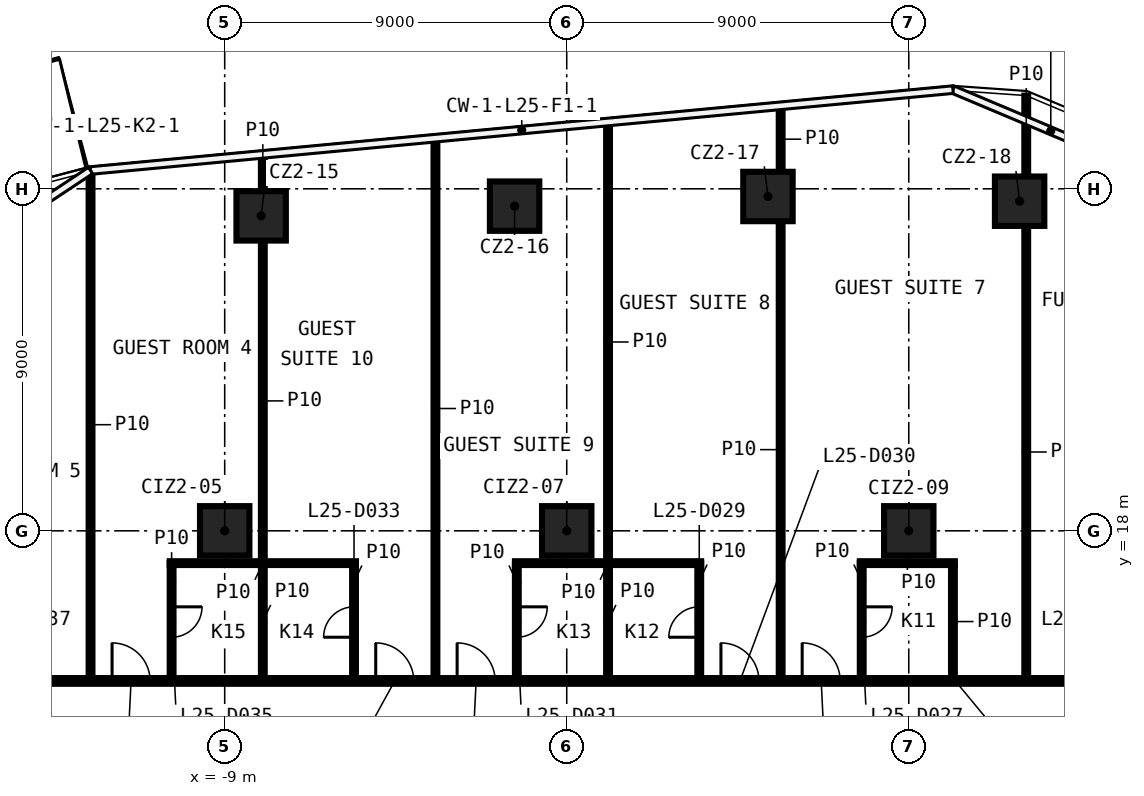
"""IFC4 building model, lengths in metres.
Left out: names, types, materials, properties, quantities, classifications, styles, units other than length and angle.
Written with IfcOpenShell. Run it as: python <this file> out.ifc"""

import sys

from ifc_helpers import new_model, si_unit, direction, frame, frame_2d, origin, origin_2d, place, context, subcontext, project, spatial, rectangle, extrude, element, fill, save


model = new_model("IFC4")
c1 = context("Model", 3, precision=1e-05, world=origin(), true_north=direction((0.0, 1.0)))
c2 = subcontext(c1, "Body", "Model", "MODEL_VIEW")
j1 = project(units=[si_unit("LENGTHUNIT", "METRE"), si_unit("PLANEANGLEUNIT", "RADIAN")], contexts=[c1])
p1 = place(None, origin())
s1 = spatial("IfcSite", under=j1, at=p1, CompositionType="ELEMENT")
p2 = place(p1, origin())
s2 = spatial("IfcBuilding", under=s1, at=p2, CompositionType="ELEMENT")
p3 = place(p2, frame((0.0, 0.0, 117.4)))
s3 = spatial("IfcBuildingStorey", under=s2, at=p3, CompositionType="ELEMENT", Elevation=117.4)
for number, where, z_axis, x_axis in (
    (1, (-8.041, 26.288, 0.0), (0.0, 0.0, 1.0), (1.0, 0.0, 0.0)),
    (2, (-1.372, 26.544, 0.0), (0.0, 0.0, 1.0), (1.0, 0.0, 0.0)),
    (3, (5.295, 26.798, 0.0), (0.0, 0.0, 1.0), (1.0, 0.0, 0.0)),
    (4, (11.917, 26.674, 0.0), (0.0, 0.0, 1.0), (1.0, 0.0, 0.0)),
    (5, (-9.0, 18.0, 0.0), (0.0, 0.0, 1.0), (1.0, 0.0, 0.0)),
    (6, (0.0, 18.0, 0.0), (0.0, 0.0, 1.0), (1.0, 0.0, 0.0)),
    (7, (9.0, 18.0, 0.0), (0.0, 0.0, 1.0), (1.0, 0.0, 0.0)),
):
    element("IfcColumn", number, at=place(p3, frame(where, z_axis=z_axis, x_axis=x_axis)), inside=s3, PredefinedType="COLUMN", context=c2, shape_type="SweptSolid", body=[
        extrude(rectangle(XDim=1.3, YDim=1.3, at=origin_2d()), origin(), (0.0, 0.0, 1.0), 3.3),
    ])
p4 = place(p3, frame((-17.125, 14.05, 0.0), z_axis=(0.0, 0.0, 1.0), x_axis=(1.0, 0.0, 0.0)))
e8 = element("IfcWall", 8, at=p4, inside=s3, PredefinedType="PARTITIONING", context=c2, shape_type="SweptSolid", body=[
    extrude(rectangle(XDim=34.25, YDim=0.15, at=frame_2d((17.125, 0.0))), origin(), (0.0, 0.0, 1.0), 3.3),
])
p5 = place(p4, frame((30.377, 0.0, 0.0)))
e9 = element("IfcOpeningElement", 9, at=p5, cuts=e8, PredefinedType="OPENING", context=c2, shape_type="SweptSolid", body=[
    extrude(rectangle(XDim=0.9, YDim=2.1, at=frame_2d((0.45, 1.05))), frame((0.0, 0.085, 0.0), z_axis=(0.0, -1.0, 0.0), x_axis=(1.0, 0.0, 0.0)), (0.0, 0.0, 1.0), 0.17),
])
p6 = place(p4, frame((23.321, 0.0, 0.0)))
e10 = element("IfcOpeningElement", 10, at=p6, cuts=e8, PredefinedType="OPENING", context=c2, shape_type="SweptSolid", body=[
    extrude(rectangle(XDim=1.0, YDim=2.1, at=frame_2d((0.5, 1.05))), frame((0.0, 0.085, 0.0), z_axis=(0.0, -1.0, 0.0), x_axis=(1.0, 0.0, 0.0)), (0.0, 0.0, 1.0), 0.17),
])
p7 = place(p4, frame((21.183, 0.0, 0.0)))
e11 = element("IfcOpeningElement", 11, at=p7, cuts=e8, PredefinedType="OPENING", context=c2, shape_type="SweptSolid", body=[
    extrude(rectangle(XDim=1.0, YDim=2.1, at=frame_2d((0.5, 1.05))), frame((0.0, 0.085, 0.0), z_axis=(0.0, -1.0, 0.0), x_axis=(1.0, 0.0, 0.0)), (0.0, 0.0, 1.0), 0.17),
])
p8 = place(p4, frame((14.241, 0.0, 0.0)))
e12 = element("IfcOpeningElement", 12, at=p8, cuts=e8, PredefinedType="OPENING", context=c2, shape_type="SweptSolid", body=[
    extrude(rectangle(XDim=1.0, YDim=2.1, at=frame_2d((0.5, 1.05))), frame((0.0, 0.085, 0.0), z_axis=(0.0, -1.0, 0.0), x_axis=(1.0, 0.0, 0.0)), (0.0, 0.0, 1.0), 0.17),
])
p9 = place(p4, frame((12.099, 0.0, 0.0)))
e13 = element("IfcOpeningElement", 13, at=p9, cuts=e8, PredefinedType="OPENING", context=c2, shape_type="SweptSolid", body=[
    extrude(rectangle(XDim=1.0, YDim=2.1, at=frame_2d((0.5, 1.05))), frame((0.0, 0.085, 0.0), z_axis=(0.0, -1.0, 0.0), x_axis=(1.0, 0.0, 0.0)), (0.0, 0.0, 1.0), 0.17),
])
p10 = place(p4, frame((5.161, 0.0, 0.0)))
e14 = element("IfcOpeningElement", 14, at=p10, cuts=e8, PredefinedType="OPENING", context=c2, shape_type="SweptSolid", body=[
    extrude(rectangle(XDim=1.0, YDim=2.1, at=frame_2d((0.5, 1.05))), frame((0.0, 0.085, 0.0), z_axis=(0.0, -1.0, 0.0), x_axis=(1.0, 0.0, 0.0)), (0.0, 0.0, 1.0), 0.17),
])
p11 = place(p4, frame((2.406, 0.0, 0.0)))
e15 = element("IfcOpeningElement", 15, at=p11, cuts=e8, PredefinedType="OPENING", context=c2, shape_type="SweptSolid", body=[
    extrude(rectangle(XDim=0.9, YDim=2.1, at=frame_2d((0.45, 1.05))), frame((0.0, 0.085, 0.0), z_axis=(0.0, -1.0, 0.0), x_axis=(1.0, 0.0, 0.0)), (0.0, 0.0, 1.0), 0.17),
])
p12 = place(p3, frame((-10.447, 17.15, 0.0), z_axis=(0.0, 0.0, 1.0), x_axis=(1.0, 0.0, 0.0)))
e16 = element("IfcWall", 16, at=p12, inside=s3, PredefinedType="PARTITIONING", context=c2, shape_type="SweptSolid", body=[
    extrude(rectangle(XDim=4.9, YDim=0.1, at=frame_2d((2.45, 0.0))), origin(), (0.0, 0.0, 1.0), 3.3),
])
p13 = place(p3, frame((-1.363, 17.15, 0.0), z_axis=(0.0, 0.0, 1.0), x_axis=(1.0, 0.0, 0.0)))
e17 = element("IfcWall", 17, at=p13, inside=s3, PredefinedType="PARTITIONING", context=c2, shape_type="SweptSolid", body=[
    extrude(rectangle(XDim=4.9, YDim=0.1, at=frame_2d((2.45, 0.0))), origin(), (0.0, 0.0, 1.0), 3.3),
])
p14 = place(p3, frame((7.712, 17.15, 0.0), z_axis=(0.0, 0.0, 1.0), x_axis=(1.0, 0.0, 0.0)))
e18 = element("IfcWall", 18, at=p14, inside=s3, PredefinedType="PARTITIONING", context=c2, shape_type="SweptSolid", body=[
    extrude(rectangle(XDim=2.5, YDim=0.1, at=frame_2d((1.25, 0.0))), origin(), (0.0, 0.0, 1.0), 3.3),
])
p15 = place(p3, frame((12.091, 14.125, 0.0), z_axis=(0.0, 0.0, 1.0), x_axis=(0.0, 1.0, 0.0)))
e19 = element("IfcWall", 19, at=p15, inside=s3, PredefinedType="PARTITIONING", context=c2, shape_type="SweptSolid", body=[
    extrude(rectangle(XDim=11.899, YDim=0.1, at=frame_2d((5.949, 0.0))), origin(), (0.0, 0.0, 1.0), 3.3),
])
p16 = place(p3, frame((12.091, 27.324, 0.0), z_axis=(0.0, 0.0, 1.0), x_axis=(0.0, 1.0, 0.0)))
e20 = element("IfcWall", 20, at=p16, inside=s3, PredefinedType="PARTITIONING", context=c2, shape_type="SweptSolid", body=[
    extrude(rectangle(XDim=2.128, YDim=0.1, at=frame_2d((1.064, 0.0))), origin(), (0.0, 0.0, 1.0), 3.3),
])
p17 = place(p3, frame((10.162, 14.125, 0.0), z_axis=(0.0, 0.0, 1.0), x_axis=(0.0, 1.0, 0.0)))
e21 = element("IfcWall", 21, at=p17, inside=s3, PredefinedType="PARTITIONING", context=c2, shape_type="SweptSolid", body=[
    extrude(rectangle(XDim=2.975, YDim=0.1, at=frame_2d((1.488, 0.0))), origin(), (0.0, 0.0, 1.0), 3.3),
])
p18 = place(p3, frame((7.762, 17.15, 0.0), z_axis=(0.0, 0.0, 1.0), x_axis=(0.0, -1.0, 0.0)))
e22 = element("IfcWall", 22, at=p18, inside=s3, PredefinedType="PARTITIONING", context=c2, shape_type="SweptSolid", body=[
    extrude(rectangle(XDim=3.025, YDim=0.1, at=frame_2d((1.512, 0.0))), origin(), (0.0, 0.0, 1.0), 3.3),
])
p19 = place(p18, frame((1.15, 0.0, 0.0)))
e23 = element("IfcOpeningElement", 23, at=p19, cuts=e22, PredefinedType="OPENING", context=c2, shape_type="SweptSolid", body=[
    extrude(rectangle(XDim=0.8, YDim=2.1, at=frame_2d((0.4, 1.05))), frame((0.0, 0.06, 0.0), z_axis=(0.0, -1.0, 0.0), x_axis=(1.0, 0.0, 0.0)), (0.0, 0.0, 1.0), 0.12),
])
p20 = place(p3, frame((5.629, 14.125, 0.0), z_axis=(0.0, 0.0, 1.0), x_axis=(0.0, 1.0, 0.0)))
e24 = element("IfcWall", 24, at=p20, inside=s3, PredefinedType="PARTITIONING", context=c2, shape_type="SweptSolid", body=[
    extrude(rectangle(XDim=12.023, YDim=0.1, at=frame_2d((6.011, 0.0))), origin(), (0.0, 0.0, 1.0), 3.3),
])
p21 = place(p3, frame((5.629, 27.448, 0.0), z_axis=(0.0, 0.0, 1.0), x_axis=(0.0, 1.0, 0.0)))
e25 = element("IfcWall", 25, at=p21, inside=s3, PredefinedType="PARTITIONING", context=c2, shape_type="SweptSolid", body=[
    extrude(rectangle(XDim=1.717, YDim=0.1, at=frame_2d((0.858, 0.0))), origin(), (0.0, 0.0, 1.0), 3.3),
])
p22 = place(p3, frame((3.487, 14.125, 0.0), z_axis=(0.0, 0.0, 1.0), x_axis=(0.0, 1.0, 0.0)))
e26 = element("IfcWall", 26, at=p22, inside=s3, PredefinedType="PARTITIONING", context=c2, shape_type="SweptSolid", body=[
    extrude(rectangle(XDim=3.025, YDim=0.1, at=frame_2d((1.512, 0.0))), origin(), (0.0, 0.0, 1.0), 3.3),
])
p23 = place(p22, frame((1.075, 0.0, 0.0)))
e27 = element("IfcOpeningElement", 27, at=p23, cuts=e26, PredefinedType="OPENING", context=c2, shape_type="SweptSolid", body=[
    extrude(rectangle(XDim=0.8, YDim=2.1, at=frame_2d((0.4, 1.05))), frame((0.0, 0.06, 0.0), z_axis=(0.0, -1.0, 0.0), x_axis=(1.0, 0.0, 0.0)), (0.0, 0.0, 1.0), 0.12),
])
p24 = place(p3, frame((1.087, 14.125, 0.0), z_axis=(0.0, 0.0, 1.0), x_axis=(0.0, 1.0, 0.0)))
e28 = element("IfcWall", 28, at=p24, inside=s3, PredefinedType="PARTITIONING", context=c2, shape_type="SweptSolid", body=[
    extrude(rectangle(XDim=2.975, YDim=0.1, at=frame_2d((1.488, 0.0))), origin(), (0.0, 0.0, 1.0), 3.3),
])
p25 = place(p3, frame((1.087, 17.2, 0.0), z_axis=(0.0, 0.0, 1.0), x_axis=(0.0, 1.0, 0.0)))
e29 = element("IfcWall", 29, at=p25, inside=s3, PredefinedType="PARTITIONING", context=c2, shape_type="SweptSolid", body=[
    extrude(rectangle(XDim=11.539, YDim=0.1, at=frame_2d((5.77, 0.0))), origin(), (0.0, 0.0, 1.0), 3.3),
])
p26 = place(p3, frame((-1.313, 17.1, 0.0), z_axis=(0.0, 0.0, 1.0), x_axis=(0.0, -1.0, 0.0)))
e30 = element("IfcWall", 30, at=p26, inside=s3, PredefinedType="PARTITIONING", context=c2, shape_type="SweptSolid", body=[
    extrude(rectangle(XDim=2.975, YDim=0.1, at=frame_2d((1.488, 0.0))), origin(), (0.0, 0.0, 1.0), 3.3),
])
p27 = place(p26, frame((1.1, 0.0, 0.0)))
e31 = element("IfcOpeningElement", 31, at=p27, cuts=e30, PredefinedType="OPENING", context=c2, shape_type="SweptSolid", body=[
    extrude(rectangle(XDim=0.8, YDim=2.1, at=frame_2d((0.4, 1.05))), frame((0.0, 0.06, 0.0), z_axis=(0.0, -1.0, 0.0), x_axis=(1.0, 0.0, 0.0)), (0.0, 0.0, 1.0), 0.12),
])
p28 = place(p3, frame((-3.455, 14.125, 0.0), z_axis=(0.0, 0.0, 1.0), x_axis=(0.0, 1.0, 0.0)))
e32 = element("IfcWall", 32, at=p28, inside=s3, PredefinedType="PARTITIONING", context=c2, shape_type="SweptSolid", body=[
    extrude(rectangle(XDim=14.188, YDim=0.1, at=frame_2d((7.094, 0.0))), origin(), (0.0, 0.0, 1.0), 3.3),
])
p29 = place(p3, frame((-5.597, 14.125, 0.0), z_axis=(0.0, 0.0, 1.0), x_axis=(0.0, 1.0, 0.0)))
e33 = element("IfcWall", 33, at=p29, inside=s3, PredefinedType="PARTITIONING", context=c2, shape_type="SweptSolid", body=[
    extrude(rectangle(XDim=2.975, YDim=0.1, at=frame_2d((1.488, 0.0))), origin(), (0.0, 0.0, 1.0), 3.3),
])
p30 = place(p29, frame((1.075, 0.0, 0.0)))
e34 = element("IfcOpeningElement", 34, at=p30, cuts=e33, PredefinedType="OPENING", context=c2, shape_type="SweptSolid", body=[
    extrude(rectangle(XDim=0.8, YDim=2.1, at=frame_2d((0.4, 1.05))), frame((0.0, 0.06, 0.0), z_axis=(0.0, -1.0, 0.0), x_axis=(1.0, 0.0, 0.0)), (0.0, 0.0, 1.0), 0.12),
])
p31 = place(p3, frame((-7.997, 14.125, 0.0), z_axis=(0.0, 0.0, 1.0), x_axis=(0.0, 1.0, 0.0)))
e35 = element("IfcWall", 35, at=p31, inside=s3, PredefinedType="PARTITIONING", context=c2, shape_type="SweptSolid", body=[
    extrude(rectangle(XDim=2.975, YDim=0.1, at=frame_2d((1.488, 0.0))), origin(), (0.0, 0.0, 1.0), 3.3),
])
p32 = place(p3, frame((-7.997, 17.2, 0.0), z_axis=(0.0, 0.0, 1.0), x_axis=(0.0, 1.0, 0.0)))
e36 = element("IfcWall", 36, at=p32, inside=s3, PredefinedType="PARTITIONING", context=c2, shape_type="SweptSolid", body=[
    extrude(rectangle(XDim=8.438, YDim=0.1, at=frame_2d((4.219, 0.0))), origin(), (0.0, 0.0, 1.0), 3.3),
])
p33 = place(p3, frame((-7.997, 26.938, 0.0), z_axis=(0.0, 0.0, 1.0), x_axis=(0.0, 1.0, 0.0)))
e37 = element("IfcWall", 37, at=p33, inside=s3, PredefinedType="PARTITIONING", context=c2, shape_type="SweptSolid", body=[
    extrude(rectangle(XDim=0.949, YDim=0.1, at=frame_2d((0.474, 0.0))), origin(), (0.0, 0.0, 1.0), 3.3),
])
p34 = place(p3, frame((-10.397, 17.15, 0.0), z_axis=(0.0, 0.0, 1.0), x_axis=(0.0, -1.0, 0.0)))
e38 = element("IfcWall", 38, at=p34, inside=s3, PredefinedType="PARTITIONING", context=c2, shape_type="SweptSolid", body=[
    extrude(rectangle(XDim=3.025, YDim=0.1, at=frame_2d((1.512, 0.0))), origin(), (0.0, 0.0, 1.0), 3.3),
])
p35 = place(p34, frame((1.15, 0.0, 0.0)))
e39 = element("IfcOpeningElement", 39, at=p35, cuts=e38, PredefinedType="OPENING", context=c2, shape_type="SweptSolid", body=[
    extrude(rectangle(XDim=0.8, YDim=2.1, at=frame_2d((0.4, 1.05))), frame((0.0, 0.06, 0.0), z_axis=(0.0, -1.0, 0.0), x_axis=(1.0, 0.0, 0.0)), (0.0, 0.0, 1.0), 0.12),
])
p36 = place(p3, frame((-12.53, 14.125, 0.0), z_axis=(0.0, 0.0, 1.0), x_axis=(0.0, 1.0, 0.0)))
e40 = element("IfcWall", 40, at=p36, inside=s3, PredefinedType="PARTITIONING", context=c2, shape_type="SweptSolid", body=[
    extrude(rectangle(XDim=13.336, YDim=0.1, at=frame_2d((6.668, 0.0))), origin(), (0.0, 0.0, 1.0), 3.3),
])
p37 = place(p19, origin())
e41 = element("IfcDoor", 41, at=p37, inside=s3, OperationType="SINGLE_SWING_LEFT", PredefinedType="DOOR", context=c2, shape_type="SweptSolid", body=[
    extrude(rectangle(XDim=0.8, YDim=2.1, at=frame_2d((0.4, 1.05))), frame((0.0, 0.025, 0.0), z_axis=(0.0, -1.0, 0.0), x_axis=(1.0, 0.0, 0.0)), (0.0, 0.0, 1.0), 0.05),
])
fill(e23, e41)
p38 = place(p6, origin())
e42 = element("IfcDoor", 42, at=p38, inside=s3, OperationType="SINGLE_SWING_RIGHT", PredefinedType="DOOR", context=c2, shape_type="SweptSolid", body=[
    extrude(rectangle(XDim=1.0, YDim=2.1, at=frame_2d((0.5, 1.05))), frame((0.0, 0.025, 0.0), z_axis=(0.0, -1.0, 0.0), x_axis=(1.0, 0.0, 0.0)), (0.0, 0.0, 1.0), 0.05),
])
fill(e10, e42)
p39 = place(p23, origin())
e43 = element("IfcDoor", 43, at=p39, inside=s3, OperationType="SINGLE_SWING_RIGHT", PredefinedType="DOOR", context=c2, shape_type="SweptSolid", body=[
    extrude(rectangle(XDim=0.8, YDim=2.1, at=frame_2d((0.4, 1.05))), frame((0.0, 0.025, 0.0), z_axis=(0.0, -1.0, 0.0), x_axis=(1.0, 0.0, 0.0)), (0.0, 0.0, 1.0), 0.05),
])
fill(e27, e43)
p40 = place(p7, origin())
e44 = element("IfcDoor", 44, at=p40, inside=s3, OperationType="SINGLE_SWING_LEFT", PredefinedType="DOOR", context=c2, shape_type="SweptSolid", body=[
    extrude(rectangle(XDim=1.0, YDim=2.1, at=frame_2d((0.5, 1.05))), frame((0.0, 0.025, 0.0), z_axis=(0.0, -1.0, 0.0), x_axis=(1.0, 0.0, 0.0)), (0.0, 0.0, 1.0), 0.05),
])
fill(e11, e44)
p41 = place(p27, origin())
e45 = element("IfcDoor", 45, at=p41, inside=s3, OperationType="SINGLE_SWING_LEFT", PredefinedType="DOOR", context=c2, shape_type="SweptSolid", body=[
    extrude(rectangle(XDim=0.8, YDim=2.1, at=frame_2d((0.4, 1.05))), frame((0.0, 0.025, 0.0), z_axis=(0.0, -1.0, 0.0), x_axis=(1.0, 0.0, 0.0)), (0.0, 0.0, 1.0), 0.05),
])
fill(e31, e45)
p42 = place(p8, origin())
e46 = element("IfcDoor", 46, at=p42, inside=s3, OperationType="SINGLE_SWING_RIGHT", PredefinedType="DOOR", context=c2, shape_type="SweptSolid", body=[
    extrude(rectangle(XDim=1.0, YDim=2.1, at=frame_2d((0.5, 1.05))), frame((0.0, 0.025, 0.0), z_axis=(0.0, -1.0, 0.0), x_axis=(1.0, 0.0, 0.0)), (0.0, 0.0, 1.0), 0.05),
])
fill(e12, e46)
p43 = place(p30, origin())
e47 = element("IfcDoor", 47, at=p43, inside=s3, OperationType="SINGLE_SWING_RIGHT", PredefinedType="DOOR", context=c2, shape_type="SweptSolid", body=[
    extrude(rectangle(XDim=0.8, YDim=2.1, at=frame_2d((0.4, 1.05))), frame((0.0, 0.025, 0.0), z_axis=(0.0, -1.0, 0.0), x_axis=(1.0, 0.0, 0.0)), (0.0, 0.0, 1.0), 0.05),
])
fill(e34, e47)
p44 = place(p9, origin())
e48 = element("IfcDoor", 48, at=p44, inside=s3, OperationType="SINGLE_SWING_LEFT", PredefinedType="DOOR", context=c2, shape_type="SweptSolid", body=[
    extrude(rectangle(XDim=1.0, YDim=2.1, at=frame_2d((0.5, 1.05))), frame((0.0, 0.025, 0.0), z_axis=(0.0, -1.0, 0.0), x_axis=(1.0, 0.0, 0.0)), (0.0, 0.0, 1.0), 0.05),
])
fill(e13, e48)
p45 = place(p35, origin())
e49 = element("IfcDoor", 49, at=p45, inside=s3, OperationType="SINGLE_SWING_LEFT", PredefinedType="DOOR", context=c2, shape_type="SweptSolid", body=[
    extrude(rectangle(XDim=0.8, YDim=2.1, at=frame_2d((0.4, 1.05))), frame((0.0, 0.025, 0.0), z_axis=(0.0, -1.0, 0.0), x_axis=(1.0, 0.0, 0.0)), (0.0, 0.0, 1.0), 0.05),
])
fill(e39, e49)
p46 = place(p10, origin())
e50 = element("IfcDoor", 50, at=p46, inside=s3, OperationType="SINGLE_SWING_RIGHT", PredefinedType="DOOR", context=c2, shape_type="SweptSolid", body=[
    extrude(rectangle(XDim=1.0, YDim=2.1, at=frame_2d((0.5, 1.05))), frame((0.0, 0.025, 0.0), z_axis=(0.0, -1.0, 0.0), x_axis=(1.0, 0.0, 0.0)), (0.0, 0.0, 1.0), 0.05),
])
fill(e14, e50)
save(model, sys.argv[1])
